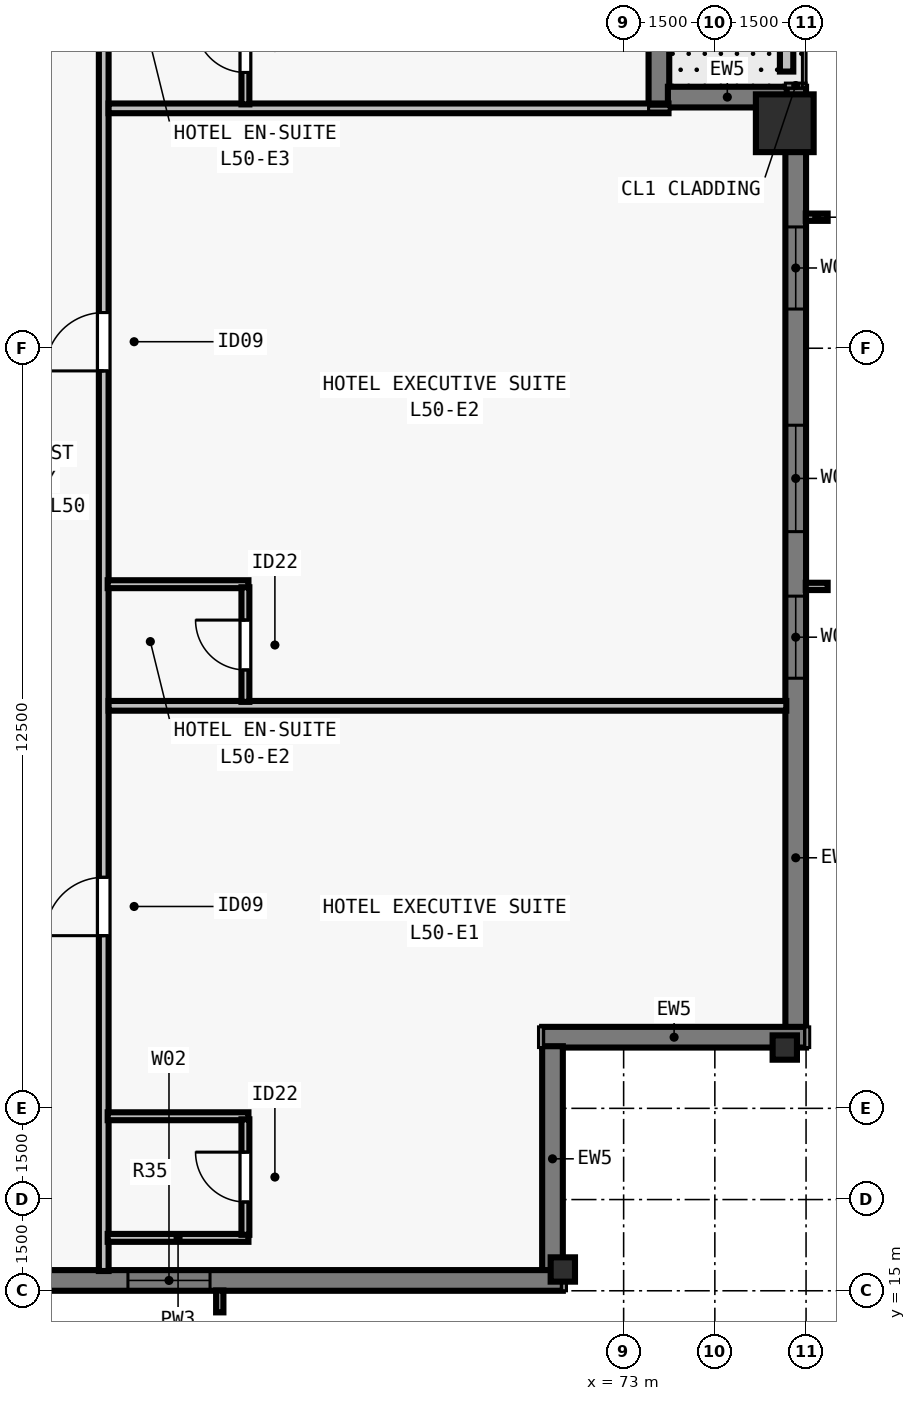
"""IFC4 building model, lengths in metres.
Left out: names, types, materials, properties, quantities, classifications, styles, units other than length and angle.
Written with IfcOpenShell. Run it as: python <this file> out.ifc"""

import sys

from ifc_helpers import new_model, si_unit, direction, frame, frame_2d, origin, origin_2d, place, context, subcontext, project, spatial, rectangle, i_section, extrude, element, fill, save


model = new_model("IFC4")
c1 = context("Model", 3, precision=1e-05, world=origin(), true_north=direction((0.0, 1.0)))
c2 = subcontext(c1, "Body", "Model", "MODEL_VIEW")
j1 = project(units=[si_unit("LENGTHUNIT", "METRE"), si_unit("PLANEANGLEUNIT", "RADIAN")], contexts=[c1])
p1 = place(None, origin())
s1 = spatial("IfcSite", under=j1, at=p1, CompositionType="ELEMENT")
p2 = place(p1, origin())
s2 = spatial("IfcBuilding", under=s1, at=p2, CompositionType="ELEMENT")
p3 = place(p2, frame((0.0, 0.0, 183.0)))
s3 = spatial("IfcBuildingStorey", under=s2, at=p3, CompositionType="ELEMENT", Elevation=183.0)
for number, where, z_axis, x_axis in (
    (1, (72.0, 15.35, 0.0), (0.0, 0.0, 1.0), (1.0, 0.0, 0.0)),
    (2, (75.65, 19.0, 0.0), (0.0, 0.0, 1.0), (0.0, 1.0, 0.0)),
):
    element("IfcColumn", number, at=place(p3, frame(where, z_axis=z_axis, x_axis=x_axis)), inside=s3, PredefinedType="COLUMN", context=c2, shape_type="SweptSolid", body=[
        extrude(i_section(OverallWidth=0.4, OverallDepth=0.4, WebThickness=0.022, FlangeThickness=0.036, at=origin_2d()), origin(), (0.0, 0.0, 1.0), 3.5),
    ])
p4 = place(p3, frame((75.65, 34.2, 0.0), z_axis=(0.0, 0.0, 1.0), x_axis=(0.0, 1.0, 0.0)))
e3 = element("IfcColumn", 3, at=p4, inside=s3, PredefinedType="COLUMN", context=c2, shape_type="SweptSolid", body=[
    extrude(rectangle(XDim=0.95, YDim=0.95, at=origin_2d()), origin(), (0.0, 0.0, 1.0), 3.5),
])
p5 = place(p3, frame((75.83, 34.8, 0.0), z_axis=(0.0, 0.0, 1.0), x_axis=(0.0, -1.0, 0.0)))
e4 = element("IfcWall", 4, at=p5, inside=s3, PredefinedType="SOLIDWALL", context=c2, shape_type="SweptSolid", body=[
    extrude(rectangle(XDim=15.482, YDim=0.34, at=frame_2d((7.741, 0.0))), origin(), (0.0, 0.0, 1.0), 3.28),
])
p6 = place(p5, frame((2.305, 0.0, 0.8)))
e5 = element("IfcOpeningElement", 5, at=p6, cuts=e4, PredefinedType="OPENING", context=c2, shape_type="SweptSolid", body=[
    extrude(rectangle(XDim=1.35, YDim=1.66, at=frame_2d((0.675, 0.83))), frame((0.0, 0.18, 0.0), z_axis=(0.0, -1.0, 0.0), x_axis=(1.0, 0.0, 0.0)), (0.0, 0.0, 1.0), 0.36),
])
p7 = place(p5, frame((5.566, 0.0, 0.8)))
e6 = element("IfcOpeningElement", 6, at=p7, cuts=e4, PredefinedType="OPENING", context=c2, shape_type="SweptSolid", body=[
    extrude(rectangle(XDim=1.75, YDim=1.66, at=frame_2d((0.875, 0.83))), frame((0.0, 0.18, 0.0), z_axis=(0.0, -1.0, 0.0), x_axis=(1.0, 0.0, 0.0)), (0.0, 0.0, 1.0), 0.36),
])
p8 = place(p5, frame((8.377, 0.0, 0.8)))
e7 = element("IfcOpeningElement", 7, at=p8, cuts=e4, PredefinedType="OPENING", context=c2, shape_type="SweptSolid", body=[
    extrude(rectangle(XDim=1.35, YDim=1.66, at=frame_2d((0.675, 0.83))), frame((0.0, 0.18, 0.0), z_axis=(0.0, -1.0, 0.0), x_axis=(1.0, 0.0, 0.0)), (0.0, 0.0, 1.0), 0.36),
])
p9 = place(p3, frame((76.0, 19.17, 0.0), z_axis=(0.0, 0.0, 1.0), x_axis=(-1.0, 0.0, 0.0)))
e8 = element("IfcWall", 8, at=p9, inside=s3, PredefinedType="SOLIDWALL", context=c2, shape_type="SweptSolid", body=[
    extrude(rectangle(XDim=4.34, YDim=0.34, at=frame_2d((2.17, 0.0))), origin(), (0.0, 0.0, 1.0), 3.28),
])
p10 = place(p3, frame((71.83, 19.022, 0.0), z_axis=(0.0, 0.0, 1.0), x_axis=(0.0, -1.0, 0.0)))
e9 = element("IfcWall", 9, at=p10, inside=s3, PredefinedType="SOLIDWALL", context=c2, shape_type="SweptSolid", body=[
    extrude(rectangle(XDim=3.704, YDim=0.34, at=frame_2d((1.852, 0.0))), origin(), (0.0, 0.0, 1.0), 3.28),
])
p11 = place(p3, frame((72.0, 15.17, 0.0), z_axis=(0.0, 0.0, 1.0), x_axis=(-1.0, 0.0, 0.0)))
e10 = element("IfcWall", 10, at=p11, inside=s3, PredefinedType="SOLIDWALL", context=c2, shape_type="SweptSolid", body=[
    extrude(rectangle(XDim=39.682, YDim=0.34, at=frame_2d((19.841, 0.0))), origin(), (0.0, 0.0, 1.0), 3.28),
])
p12 = place(p11, frame((5.802, 0.0, 0.8)))
e11 = element("IfcOpeningElement", 11, at=p12, cuts=e10, PredefinedType="OPENING", context=c2, shape_type="SweptSolid", body=[
    extrude(rectangle(XDim=1.35, YDim=1.66, at=frame_2d((0.675, 0.83))), frame((0.0, 0.18, 0.0), z_axis=(0.0, -1.0, 0.0), x_axis=(1.0, 0.0, 0.0)), (0.0, 0.0, 1.0), 0.36),
])
p13 = place(p11, frame((12.059, 0.0, 0.8)))
e12 = element("IfcOpeningElement", 12, at=p13, cuts=e10, PredefinedType="OPENING", context=c2, shape_type="SweptSolid", body=[
    extrude(rectangle(XDim=1.35, YDim=1.66, at=frame_2d((0.675, 0.83))), frame((0.0, 0.18, 0.0), z_axis=(0.0, -1.0, 0.0), x_axis=(1.0, 0.0, 0.0)), (0.0, 0.0, 1.0), 0.36),
])
p14 = place(p11, frame((19.166, 0.0, 0.8)))
e13 = element("IfcOpeningElement", 13, at=p14, cuts=e10, PredefinedType="OPENING", context=c2, shape_type="SweptSolid", body=[
    extrude(rectangle(XDim=1.35, YDim=1.66, at=frame_2d((0.675, 0.83))), frame((0.0, 0.18, 0.0), z_axis=(0.0, -1.0, 0.0), x_axis=(1.0, 0.0, 0.0)), (0.0, 0.0, 1.0), 0.36),
])
p15 = place(p11, frame((21.67, 0.0, 0.8)))
e14 = element("IfcOpeningElement", 14, at=p15, cuts=e10, PredefinedType="OPENING", context=c2, shape_type="SweptSolid", body=[
    extrude(rectangle(XDim=1.75, YDim=1.66, at=frame_2d((0.875, 0.83))), frame((0.0, 0.18, 0.0), z_axis=(0.0, -1.0, 0.0), x_axis=(1.0, 0.0, 0.0)), (0.0, 0.0, 1.0), 0.36),
])
p16 = place(p11, frame((26.273, 0.0, 0.8)))
e15 = element("IfcOpeningElement", 15, at=p16, cuts=e10, PredefinedType="OPENING", context=c2, shape_type="SweptSolid", body=[
    extrude(rectangle(XDim=1.35, YDim=1.66, at=frame_2d((0.675, 0.83))), frame((0.0, 0.18, 0.0), z_axis=(0.0, -1.0, 0.0), x_axis=(1.0, 0.0, 0.0)), (0.0, 0.0, 1.0), 0.36),
])
p17 = place(p11, frame((29.627, 0.0, 0.8)))
e16 = element("IfcOpeningElement", 16, at=p17, cuts=e10, PredefinedType="OPENING", context=c2, shape_type="SweptSolid", body=[
    extrude(rectangle(XDim=1.75, YDim=1.66, at=frame_2d((0.875, 0.83))), frame((0.0, 0.18, 0.0), z_axis=(0.0, -1.0, 0.0), x_axis=(1.0, 0.0, 0.0)), (0.0, 0.0, 1.0), 0.36),
])
p18 = place(p3, frame((73.58, 41.622, 0.0), z_axis=(0.0, 0.0, 1.0), x_axis=(0.0, -1.0, 0.0)))
e17 = element("IfcWall", 17, at=p18, inside=s3, PredefinedType="SOLIDWALL", context=c2, shape_type="SweptSolid", body=[
    extrude(rectangle(XDim=7.162, YDim=0.34, at=frame_2d((3.581, 0.0))), origin(), (0.0, 0.0, 1.0), 3.28),
])
p19 = place(p18, frame((3.081, 0.0, 0.0)))
e18 = element("IfcOpeningElement", 18, at=p19, cuts=e17, PredefinedType="OPENING", context=c2, shape_type="SweptSolid", body=[
    extrude(rectangle(XDim=1.0, YDim=2.15, at=frame_2d((0.5, 1.075))), frame((0.0, 0.18, 0.0), z_axis=(0.0, -1.0, 0.0), x_axis=(1.0, 0.0, 0.0)), (0.0, 0.0, 1.0), 0.36),
])
p20 = place(p3, frame((73.728, 34.63, 0.0), z_axis=(0.0, 0.0, 1.0), x_axis=(1.0, 0.0, 0.0)))
e19 = element("IfcWall", 19, at=p20, inside=s3, PredefinedType="SOLIDWALL", context=c2, shape_type="SweptSolid", body=[
    extrude(rectangle(XDim=1.954, YDim=0.34, at=frame_2d((0.977, 0.0))), origin(), (0.0, 0.0, 1.0), 3.28),
])
p21 = place(p3, frame((75.68, 35.05, 0.0), z_axis=(0.0, 0.0, 1.0), x_axis=(0.0, 1.0, 0.0)))
e20 = element("IfcWall", 20, at=p21, inside=s3, PredefinedType="PARAPET", context=c2, shape_type="SweptSolid", body=[
    extrude(rectangle(XDim=1.3, YDim=0.22, at=frame_2d((0.65, 0.0))), origin(), (0.0, 0.0, 1.0), 0.55),
])
p22 = place(p3, frame((64.45, 15.325, 0.0), z_axis=(0.0, 0.0, 1.0), x_axis=(0.0, 1.0, 0.0)))
e21 = element("IfcWall", 21, at=p22, inside=s3, PredefinedType="PARTITIONING", context=c2, shape_type="SweptSolid", body=[
    extrude(rectangle(XDim=47.35, YDim=0.16, at=frame_2d((23.675, 0.0))), origin(), (0.0, 0.0, 1.0), 2.555),
])
p23 = place(p22, frame((5.515, 0.0, 0.0)))
e22 = element("IfcOpeningElement", 22, at=p23, cuts=e21, PredefinedType="OPENING", context=c2, shape_type="SweptSolid", body=[
    extrude(rectangle(XDim=0.96, YDim=2.15, at=frame_2d((0.48, 1.075))), frame((0.0, 0.09, 0.0), z_axis=(0.0, -1.0, 0.0), x_axis=(1.0, 0.0, 0.0)), (0.0, 0.0, 1.0), 0.18),
])
p24 = place(p22, frame((14.802, 0.0, 0.0)))
e23 = element("IfcOpeningElement", 23, at=p24, cuts=e21, PredefinedType="OPENING", context=c2, shape_type="SweptSolid", body=[
    extrude(rectangle(XDim=0.96, YDim=2.15, at=frame_2d((0.48, 1.075))), frame((0.0, 0.09, 0.0), z_axis=(0.0, -1.0, 0.0), x_axis=(1.0, 0.0, 0.0)), (0.0, 0.0, 1.0), 0.18),
])
p25 = place(p22, frame((24.234, 0.0, 0.0)))
e24 = element("IfcOpeningElement", 24, at=p25, cuts=e21, PredefinedType="OPENING", context=c2, shape_type="SweptSolid", body=[
    extrude(rectangle(XDim=0.96, YDim=2.15, at=frame_2d((0.48, 1.075))), frame((0.0, 0.09, 0.0), z_axis=(0.0, -1.0, 0.0), x_axis=(1.0, 0.0, 0.0)), (0.0, 0.0, 1.0), 0.18),
])
p26 = place(p22, frame((33.666, 0.0, 0.0)))
e25 = element("IfcOpeningElement", 25, at=p26, cuts=e21, PredefinedType="OPENING", context=c2, shape_type="SweptSolid", body=[
    extrude(rectangle(XDim=0.96, YDim=2.15, at=frame_2d((0.48, 1.075))), frame((0.0, 0.09, 0.0), z_axis=(0.0, -1.0, 0.0), x_axis=(1.0, 0.0, 0.0)), (0.0, 0.0, 1.0), 0.18),
])
p27 = place(p22, frame((43.214, 0.0, 0.0)))
e26 = element("IfcOpeningElement", 26, at=p27, cuts=e21, PredefinedType="OPENING", context=c2, shape_type="SweptSolid", body=[
    extrude(rectangle(XDim=0.96, YDim=2.15, at=frame_2d((0.48, 1.075))), frame((0.0, 0.09, 0.0), z_axis=(0.0, -1.0, 0.0), x_axis=(1.0, 0.0, 0.0)), (0.0, 0.0, 1.0), 0.18),
])
for number, where, z_axis, x_axis in (
    (27, (64.515, 15.87, 0.0), (0.0, 0.0, 1.0), (1.0, 0.0, 0.0)),
    (28, (64.515, 17.87, 0.0), (0.0, 0.0, 1.0), (1.0, 0.0, 0.0)),
):
    element("IfcWall", number, at=place(p3, frame(where, z_axis=z_axis, x_axis=x_axis)), inside=s3, PredefinedType="PLUMBINGWALL", context=c2, shape_type="SweptSolid", body=[
        extrude(rectangle(XDim=2.315, YDim=0.13, at=frame_2d((1.158, 0.0))), origin(), (0.0, 0.0, 1.0), 3.28),
    ])
p28 = place(p3, frame((66.78, 15.92, 0.0), z_axis=(0.0, 0.0, 1.0), x_axis=(0.0, 1.0, 0.0)))
e29 = element("IfcWall", 29, at=p28, inside=s3, PredefinedType="PLUMBINGWALL", context=c2, shape_type="SweptSolid", body=[
    extrude(rectangle(XDim=1.9, YDim=0.13, at=frame_2d((0.95, 0.0))), origin(), (0.0, 0.0, 1.0), 3.28),
])
p29 = place(p28, frame((0.54, 0.0, 0.0)))
e30 = element("IfcOpeningElement", 30, at=p29, cuts=e29, PredefinedType="OPENING", context=c2, shape_type="SweptSolid", body=[
    extrude(rectangle(XDim=0.82, YDim=2.1, at=frame_2d((0.41, 1.05))), frame((0.0, 0.075, 0.0), z_axis=(0.0, -1.0, 0.0), x_axis=(1.0, 0.0, 0.0)), (0.0, 0.0, 1.0), 0.15),
])
p30 = place(p3, frame((64.53, 24.62, 0.0), z_axis=(0.0, 0.0, 1.0), x_axis=(1.0, 0.0, 0.0)))
e31 = element("IfcWall", 31, at=p30, inside=s3, PredefinedType="PARTITIONING", context=c2, shape_type="SweptSolid", body=[
    extrude(rectangle(XDim=11.145, YDim=0.16, at=frame_2d((5.573, 0.0))), origin(), (0.0, 0.0, 1.0), 2.896),
])
p31 = place(p3, frame((64.515, 26.62, 0.0), z_axis=(0.0, 0.0, 1.0), x_axis=(1.0, 0.0, 0.0)))
e32 = element("IfcWall", 32, at=p31, inside=s3, PredefinedType="PLUMBINGWALL", context=c2, shape_type="SweptSolid", body=[
    extrude(rectangle(XDim=2.315, YDim=0.13, at=frame_2d((1.158, 0.0))), origin(), (0.0, 0.0, 1.0), 2.896),
])
p32 = place(p3, frame((66.78, 24.685, 0.0), z_axis=(0.0, 0.0, 1.0), x_axis=(0.0, 1.0, 0.0)))
e33 = element("IfcWall", 33, at=p32, inside=s3, PredefinedType="PLUMBINGWALL", context=c2, shape_type="SweptSolid", body=[
    extrude(rectangle(XDim=1.885, YDim=0.13, at=frame_2d((0.942, 0.0))), origin(), (0.0, 0.0, 1.0), 3.28),
])
p33 = place(p32, frame((0.525, 0.0, 0.0)))
e34 = element("IfcOpeningElement", 34, at=p33, cuts=e33, PredefinedType="OPENING", context=c2, shape_type="SweptSolid", body=[
    extrude(rectangle(XDim=0.82, YDim=2.1, at=frame_2d((0.41, 1.05))), frame((0.0, 0.075, 0.0), z_axis=(0.0, -1.0, 0.0), x_axis=(1.0, 0.0, 0.0)), (0.0, 0.0, 1.0), 0.15),
])
p34 = place(p3, frame((64.53, 34.445, 0.0), z_axis=(0.0, 0.0, 1.0), x_axis=(1.0, 0.0, 0.0)))
e35 = element("IfcWall", 35, at=p34, inside=s3, PredefinedType="PARTITIONING", context=c2, shape_type="SweptSolid", body=[
    extrude(rectangle(XDim=9.208, YDim=0.16, at=frame_2d((4.604, 0.0))), origin(), (0.0, 0.0, 1.0), 3.28),
])
p35 = place(p3, frame((66.78, 34.51, 0.0), z_axis=(0.0, 0.0, 1.0), x_axis=(0.0, 1.0, 0.0)))
e36 = element("IfcWall", 36, at=p35, inside=s3, PredefinedType="PLUMBINGWALL", context=c2, shape_type="SweptSolid", body=[
    extrude(rectangle(XDim=1.885, YDim=0.13, at=frame_2d((0.942, 0.0))), origin(), (0.0, 0.0, 1.0), 3.28),
])
p36 = place(p35, frame((0.525, 0.0, 0.0)))
e37 = element("IfcOpeningElement", 37, at=p36, cuts=e36, PredefinedType="OPENING", context=c2, shape_type="SweptSolid", body=[
    extrude(rectangle(XDim=0.82, YDim=2.1, at=frame_2d((0.41, 1.05))), frame((0.0, 0.075, 0.0), z_axis=(0.0, -1.0, 0.0), x_axis=(1.0, 0.0, 0.0)), (0.0, 0.0, 1.0), 0.15),
])
p37 = place(p6, origin())
e38 = element("IfcWindow", 38, at=p37, inside=s3, PartitioningType="SINGLE_PANEL", PredefinedType="WINDOW", context=c2, shape_type="SweptSolid", body=[
    extrude(rectangle(XDim=1.35, YDim=1.66, at=frame_2d((0.675, 0.83))), frame((0.0, -0.05, 0.0), z_axis=(0.0, -1.0, 0.0), x_axis=(1.0, 0.0, 0.0)), (0.0, 0.0, 1.0), 0.06),
])
fill(e5, e38)
p38 = place(p7, origin())
e39 = element("IfcWindow", 39, at=p38, inside=s3, PartitioningType="SINGLE_PANEL", PredefinedType="WINDOW", context=c2, shape_type="SweptSolid", body=[
    extrude(rectangle(XDim=1.75, YDim=1.66, at=frame_2d((0.875, 0.83))), frame((0.0, -0.05, 0.0), z_axis=(0.0, -1.0, 0.0), x_axis=(1.0, 0.0, 0.0)), (0.0, 0.0, 1.0), 0.06),
])
fill(e6, e39)
p39 = place(p8, origin())
e40 = element("IfcWindow", 40, at=p39, inside=s3, PartitioningType="SINGLE_PANEL", PredefinedType="WINDOW", context=c2, shape_type="SweptSolid", body=[
    extrude(rectangle(XDim=1.35, YDim=1.66, at=frame_2d((0.675, 0.83))), frame((0.0, -0.05, 0.0), z_axis=(0.0, -1.0, 0.0), x_axis=(1.0, 0.0, 0.0)), (0.0, 0.0, 1.0), 0.06),
])
fill(e7, e40)
p40 = place(p12, origin())
e41 = element("IfcWindow", 41, at=p40, inside=s3, PartitioningType="SINGLE_PANEL", PredefinedType="WINDOW", context=c2, shape_type="SweptSolid", body=[
    extrude(rectangle(XDim=1.35, YDim=1.66, at=frame_2d((0.675, 0.83))), frame((0.0, -0.05, 0.0), z_axis=(0.0, -1.0, 0.0), x_axis=(1.0, 0.0, 0.0)), (0.0, 0.0, 1.0), 0.06),
])
fill(e11, e41)
p41 = place(p29, origin())
e42 = element("IfcDoor", 42, at=p41, inside=s3, OperationType="SINGLE_SWING_RIGHT", PredefinedType="DOOR", context=c2, shape_type="SweptSolid", body=[
    extrude(rectangle(XDim=0.82, YDim=2.1, at=frame_2d((0.41, 1.05))), frame((0.0, 0.025, 0.0), z_axis=(0.0, -1.0, 0.0), x_axis=(1.0, 0.0, 0.0)), (0.0, 0.0, 1.0), 0.05),
])
fill(e30, e42)
p42 = place(p23, origin())
e43 = element("IfcDoor", 43, at=p42, inside=s3, OperationType="SINGLE_SWING_LEFT", PredefinedType="DOOR", context=c2, shape_type="SweptSolid", body=[
    extrude(rectangle(XDim=0.96, YDim=2.15, at=frame_2d((0.48, 1.075))), frame((0.0, 0.025, 0.0), z_axis=(0.0, -1.0, 0.0), x_axis=(1.0, 0.0, 0.0)), (0.0, 0.0, 1.0), 0.05),
])
fill(e22, e43)
p43 = place(p33, origin())
e44 = element("IfcDoor", 44, at=p43, inside=s3, OperationType="SINGLE_SWING_RIGHT", PredefinedType="DOOR", context=c2, shape_type="SweptSolid", body=[
    extrude(rectangle(XDim=0.82, YDim=2.1, at=frame_2d((0.41, 1.05))), frame((0.0, 0.025, 0.0), z_axis=(0.0, -1.0, 0.0), x_axis=(1.0, 0.0, 0.0)), (0.0, 0.0, 1.0), 0.05),
])
fill(e34, e44)
p44 = place(p24, origin())
e45 = element("IfcDoor", 45, at=p44, inside=s3, OperationType="SINGLE_SWING_LEFT", PredefinedType="DOOR", context=c2, shape_type="SweptSolid", body=[
    extrude(rectangle(XDim=0.96, YDim=2.15, at=frame_2d((0.48, 1.075))), frame((0.0, 0.025, 0.0), z_axis=(0.0, -1.0, 0.0), x_axis=(1.0, 0.0, 0.0)), (0.0, 0.0, 1.0), 0.05),
])
fill(e23, e45)
p45 = place(p36, origin())
e46 = element("IfcDoor", 46, at=p45, inside=s3, OperationType="SINGLE_SWING_RIGHT", PredefinedType="DOOR", context=c2, shape_type="SweptSolid", body=[
    extrude(rectangle(XDim=0.82, YDim=2.1, at=frame_2d((0.41, 1.05))), frame((0.0, 0.025, 0.0), z_axis=(0.0, -1.0, 0.0), x_axis=(1.0, 0.0, 0.0)), (0.0, 0.0, 1.0), 0.05),
])
fill(e37, e46)
save(model, sys.argv[1])
